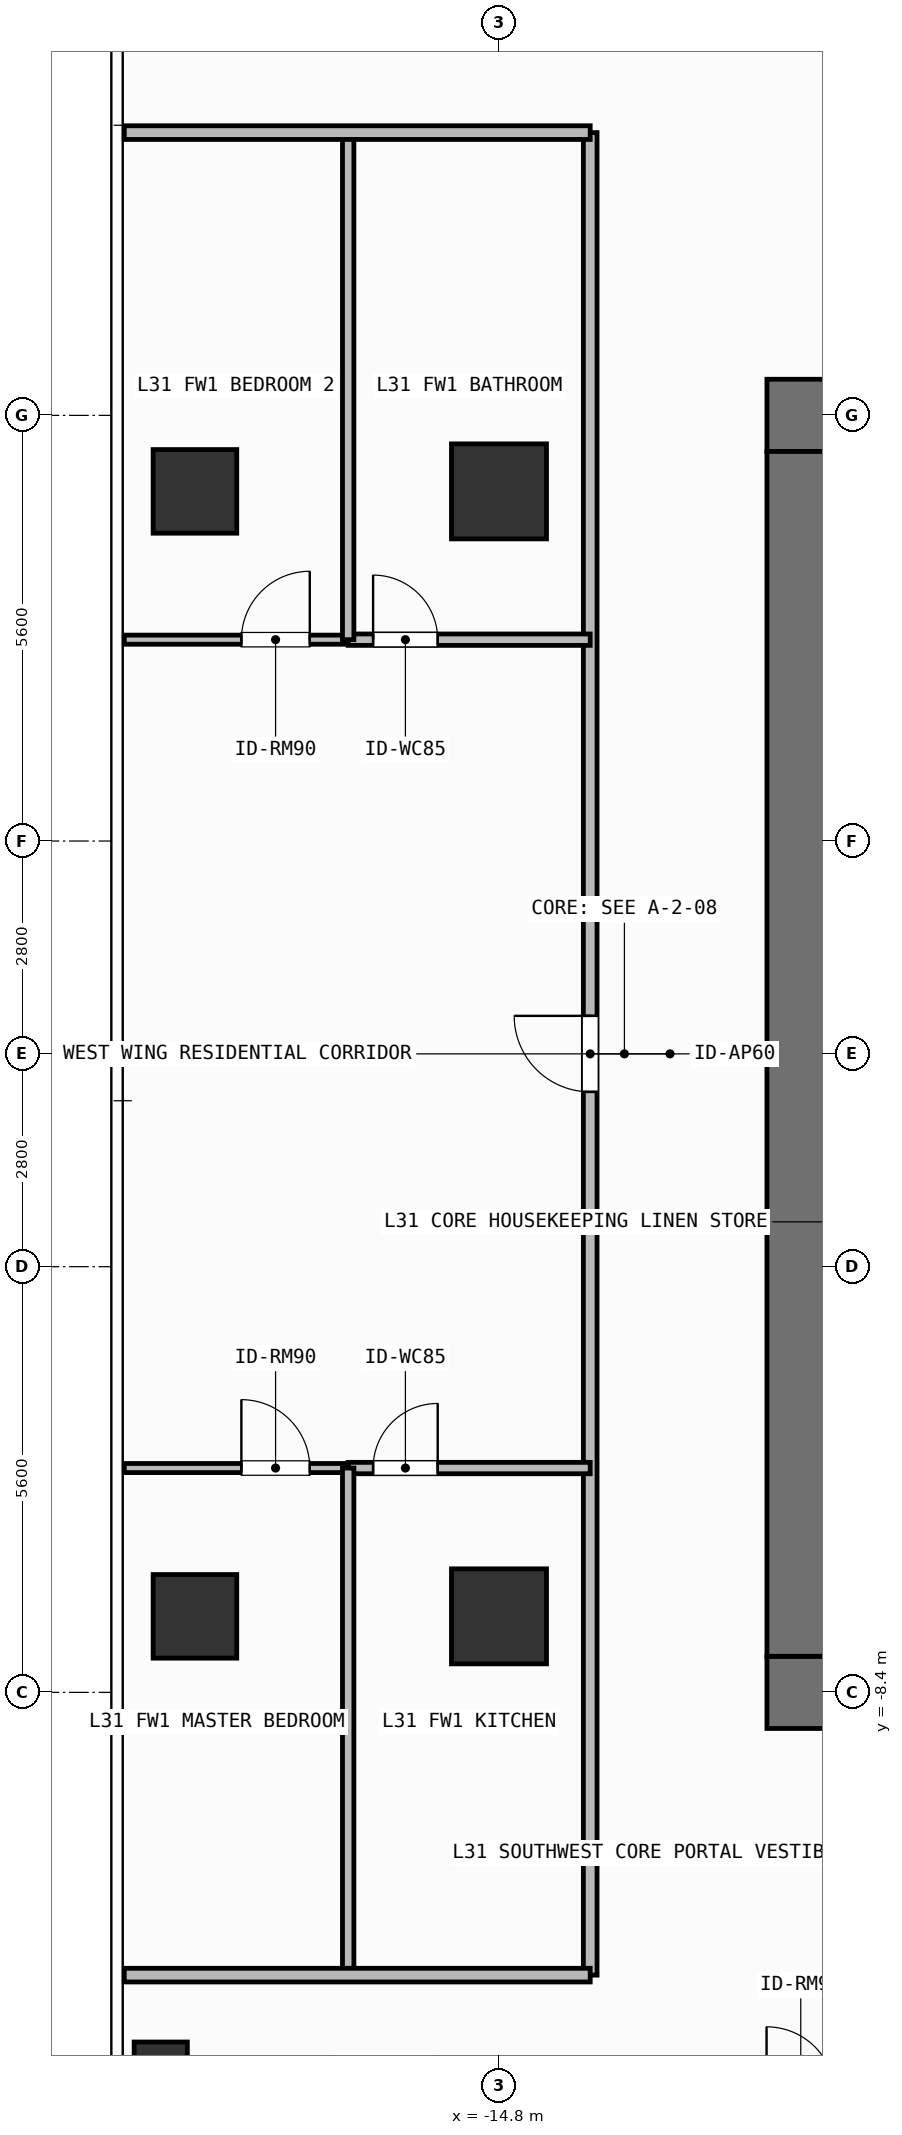
"""IFC4 building model, lengths in metres.
Left out: names, types, materials, properties, quantities, classifications, styles, units other than length and angle.
Written with IfcOpenShell. Run it as: python <this file> out.ifc"""

import sys

from ifc_helpers import new_model, si_unit, direction, frame, frame_2d, origin, origin_2d, place, context, subcontext, project, spatial, rectangle, hollow_rectangle, extrude, element, fill, save


model = new_model("IFC4")
c1 = context("Model", 3, precision=1e-05, world=origin(), true_north=direction((0.0, 1.0)))
c2 = subcontext(c1, "Body", "Model", "MODEL_VIEW")
j1 = project(units=[si_unit("LENGTHUNIT", "METRE"), si_unit("PLANEANGLEUNIT", "RADIAN")], contexts=[c1])
p1 = place(None, origin())
s1 = spatial("IfcSite", under=j1, at=p1, CompositionType="ELEMENT")
p2 = place(p1, origin())
s2 = spatial("IfcBuilding", under=s1, at=p2, CompositionType="ELEMENT")
p3 = place(p2, frame((0.0, 0.0, 125.1)))
s3 = spatial("IfcBuildingStorey", under=s2, at=p3, CompositionType="ELEMENT", Elevation=125.1)
for number, where, z_axis, x_axis in (
    (1, (-11.275, -8.4, 0.0), (0.0, 0.0, 1.0), (1.0, 0.0, 0.0)),
    (2, (-11.275, 8.4, 0.0), (0.0, 0.0, 1.0), (1.0, 0.0, 0.0)),
):
    element("IfcWall", number, at=place(p3, frame(where, z_axis=z_axis, x_axis=x_axis)), inside=s3, PredefinedType="SHEAR", context=c2, shape_type="SweptSolid", body=[
        extrude(rectangle(XDim=1.575, YDim=0.95, at=frame_2d((0.788, 0.0))), origin(), (0.0, 0.0, 1.0), 3.9),
    ])
p4 = place(p3, frame((-10.8, -7.925, 0.0), z_axis=(0.0, 0.0, 1.0), x_axis=(0.0, 1.0, 0.0)))
e3 = element("IfcWall", 3, at=p4, inside=s3, PredefinedType="SHEAR", context=c2, shape_type="SweptSolid", body=[
    extrude(rectangle(XDim=15.85, YDim=0.95, at=frame_2d((7.925, 0.0))), origin(), (0.0, 0.0, 1.0), 3.9),
])
for number, where, z_axis, x_axis in (
    (4, (-14.8, -7.4, 0.0), (0.0, 0.0, 1.0), (1.0, 0.0, 0.0)),
    (5, (-14.8, 7.4, 0.0), (0.0, 0.0, 1.0), (1.0, 0.0, 0.0)),
):
    element("IfcColumn", number, at=place(p3, frame(where, z_axis=z_axis, x_axis=x_axis)), inside=s3, PredefinedType="COLUMN", context=c2, shape_type="SweptSolid", body=[
        extrude(rectangle(XDim=1.25, YDim=1.25, at=origin_2d()), origin(), (0.0, 0.0, 1.0), 3.9),
    ])
for number, where, z_axis, x_axis in (
    (6, (-18.8, -7.4, 0.0), (0.0, 0.0, 1.0), (1.0, 0.0, 0.0)),
    (7, (-18.8, 7.4, 0.0), (0.0, 0.0, 1.0), (1.0, 0.0, 0.0)),
):
    element("IfcColumn", number, at=place(p3, frame(where, z_axis=z_axis, x_axis=x_axis)), inside=s3, PredefinedType="COLUMN", context=c2, shape_type="SweptSolid", body=[
        extrude(rectangle(XDim=1.1, YDim=1.1, at=origin_2d()), origin(), (0.0, 0.0, 1.0), 3.9),
    ])
p5 = place(p3, frame((-19.25, -13.35, 0.0), z_axis=(0.0, 0.0, 1.0), x_axis=(1.0, 0.0, 0.0)))
e8 = element("IfcColumn", 8, at=p5, inside=s3, PredefinedType="COLUMN", context=c2, shape_type="SweptSolid", body=[
    extrude(hollow_rectangle(XDim=0.7, YDim=0.7, WallThickness=0.032, at=origin_2d()), origin(), (0.0, 0.0, 1.0), 3.9),
])
p6 = place(p3, frame((-13.6, -12.12, 0.0), z_axis=(0.0, 0.0, 1.0), x_axis=(0.0, 1.0, 0.0)))
e9 = element("IfcWall", 9, at=p6, inside=s3, PredefinedType="PARTITIONING", context=c2, shape_type="SweptSolid", body=[
    extrude(rectangle(XDim=24.24, YDim=0.18, at=frame_2d((12.12, 0.0))), origin(), (0.0, 0.0, 1.0), 3.68),
])
p7 = place(p6, frame((11.62, 0.0, 0.0)))
e10 = element("IfcOpeningElement", 10, at=p7, cuts=e9, PredefinedType="OPENING", context=c2, shape_type="SweptSolid", body=[
    extrude(rectangle(XDim=1.0, YDim=2.2, at=frame_2d((0.5, 1.1))), frame((0.0, 0.1, 0.0), z_axis=(0.0, -1.0, 0.0), x_axis=(1.0, 0.0, 0.0)), (0.0, 0.0, 1.0), 0.2),
])
p8 = place(p3, frame((-16.784, 5.449, 0.0), z_axis=(0.0, 0.0, 1.0), x_axis=(1.0, 0.0, 0.0)))
e11 = element("IfcWall", 11, at=p8, inside=s3, PredefinedType="PARTITIONING", context=c2, shape_type="SweptSolid", body=[
    extrude(rectangle(XDim=3.184, YDim=0.15, at=frame_2d((1.592, 0.0))), origin(), (0.0, 0.0, 1.0), 3.68),
])
p9 = place(p8, frame((0.328, 0.0, 0.0)))
e12 = element("IfcOpeningElement", 12, at=p9, cuts=e11, PredefinedType="OPENING", context=c2, shape_type="SweptSolid", body=[
    extrude(rectangle(XDim=0.85, YDim=2.1, at=frame_2d((0.425, 1.05))), frame((0.0, 0.085, 0.0), z_axis=(0.0, -1.0, 0.0), x_axis=(1.0, 0.0, 0.0)), (0.0, 0.0, 1.0), 0.17),
])
p10 = place(p3, frame((-16.784, -5.449, 0.0), z_axis=(0.0, 0.0, 1.0), x_axis=(1.0, 0.0, 0.0)))
e13 = element("IfcWall", 13, at=p10, inside=s3, PredefinedType="PARTITIONING", context=c2, shape_type="SweptSolid", body=[
    extrude(rectangle(XDim=3.184, YDim=0.15, at=frame_2d((1.592, 0.0))), origin(), (0.0, 0.0, 1.0), 3.68),
])
p11 = place(p10, frame((0.328, 0.0, 0.0)))
e14 = element("IfcOpeningElement", 14, at=p11, cuts=e13, PredefinedType="OPENING", context=c2, shape_type="SweptSolid", body=[
    extrude(rectangle(XDim=0.85, YDim=2.1, at=frame_2d((0.425, 1.05))), frame((0.0, 0.085, 0.0), z_axis=(0.0, -1.0, 0.0), x_axis=(1.0, 0.0, 0.0)), (0.0, 0.0, 1.0), 0.17),
])
p12 = place(p3, frame((-19.73, -5.449, 0.0), z_axis=(0.0, 0.0, 1.0), x_axis=(1.0, 0.0, 0.0)))
e15 = element("IfcWall", 15, at=p12, inside=s3, PredefinedType="PARTITIONING", context=c2, shape_type="SweptSolid", body=[
    extrude(rectangle(XDim=2.946, YDim=0.12, at=frame_2d((1.473, 0.0))), origin(), (0.0, 0.0, 1.0), 3.68),
])
p13 = place(p12, frame((1.541, 0.0, 0.0)))
e16 = element("IfcOpeningElement", 16, at=p13, cuts=e15, PredefinedType="OPENING", context=c2, shape_type="SweptSolid", body=[
    extrude(rectangle(XDim=0.9, YDim=2.1, at=frame_2d((0.45, 1.05))), frame((0.0, 0.07, 0.0), z_axis=(0.0, -1.0, 0.0), x_axis=(1.0, 0.0, 0.0)), (0.0, 0.0, 1.0), 0.14),
])
p14 = place(p3, frame((-19.73, 5.449, 0.0), z_axis=(0.0, 0.0, 1.0), x_axis=(1.0, 0.0, 0.0)))
e17 = element("IfcWall", 17, at=p14, inside=s3, PredefinedType="PARTITIONING", context=c2, shape_type="SweptSolid", body=[
    extrude(rectangle(XDim=2.946, YDim=0.12, at=frame_2d((1.473, 0.0))), origin(), (0.0, 0.0, 1.0), 3.68),
])
p15 = place(p14, frame((1.541, 0.0, 0.0)))
e18 = element("IfcOpeningElement", 18, at=p15, cuts=e17, PredefinedType="OPENING", context=c2, shape_type="SweptSolid", body=[
    extrude(rectangle(XDim=0.9, YDim=2.1, at=frame_2d((0.45, 1.05))), frame((0.0, 0.07, 0.0), z_axis=(0.0, -1.0, 0.0), x_axis=(1.0, 0.0, 0.0)), (0.0, 0.0, 1.0), 0.14),
])
for number, where, z_axis, x_axis in (
    (19, (-16.784, -12.12, 0.0), (0.0, 0.0, 1.0), (0.0, 1.0, 0.0)),
    (20, (-16.784, 5.449, 0.0), (0.0, 0.0, 1.0), (0.0, 1.0, 0.0)),
):
    element("IfcWall", number, at=place(p3, frame(where, z_axis=z_axis, x_axis=x_axis)), inside=s3, PredefinedType="PARTITIONING", context=c2, shape_type="SweptSolid", body=[
        extrude(rectangle(XDim=6.671, YDim=0.15, at=frame_2d((3.335, 0.0))), origin(), (0.0, 0.0, 1.0), 3.68),
    ])
for number, where, z_axis, x_axis in (
    (21, (-19.73, -12.12, 0.0), (0.0, 0.0, 1.0), (1.0, 0.0, 0.0)),
    (22, (-19.73, 12.12, 0.0), (0.0, 0.0, 1.0), (1.0, 0.0, 0.0)),
):
    element("IfcWall", number, at=place(p3, frame(where, z_axis=z_axis, x_axis=x_axis)), inside=s3, PredefinedType="PARTITIONING", context=c2, shape_type="SweptSolid", body=[
        extrude(rectangle(XDim=6.13, YDim=0.18, at=frame_2d((3.065, 0.0))), origin(), (0.0, 0.0, 1.0), 3.68),
    ])
p16 = place(p7, origin())
e23 = element("IfcDoor", 23, at=p16, inside=s3, OperationType="SINGLE_SWING_RIGHT", PredefinedType="DOOR", context=c2, shape_type="SweptSolid", body=[
    extrude(rectangle(XDim=1.0, YDim=2.2, at=frame_2d((0.5, 1.1))), frame((0.0, 0.025, 0.0), z_axis=(0.0, -1.0, 0.0), x_axis=(1.0, 0.0, 0.0)), (0.0, 0.0, 1.0), 0.05),
])
fill(e10, e23)
p17 = place(p9, origin())
e24 = element("IfcDoor", 24, at=p17, inside=s3, OperationType="SINGLE_SWING_LEFT", PredefinedType="DOOR", context=c2, shape_type="SweptSolid", body=[
    extrude(rectangle(XDim=0.85, YDim=2.1, at=frame_2d((0.425, 1.05))), frame((0.0, 0.025, 0.0), z_axis=(0.0, -1.0, 0.0), x_axis=(1.0, 0.0, 0.0)), (0.0, 0.0, 1.0), 0.05),
])
fill(e12, e24)
p18 = place(p11, origin())
e25 = element("IfcDoor", 25, at=p18, inside=s3, OperationType="SINGLE_SWING_RIGHT", PredefinedType="DOOR", context=c2, shape_type="SweptSolid", body=[
    extrude(rectangle(XDim=0.85, YDim=2.1, at=frame_2d((0.425, 1.05))), frame((0.0, 0.025, 0.0), z_axis=(0.0, -1.0, 0.0), x_axis=(1.0, 0.0, 0.0)), (0.0, 0.0, 1.0), 0.05),
])
fill(e14, e25)
p19 = place(p13, origin())
e26 = element("IfcDoor", 26, at=p19, inside=s3, OperationType="SINGLE_SWING_LEFT", PredefinedType="DOOR", context=c2, shape_type="SweptSolid", body=[
    extrude(rectangle(XDim=0.9, YDim=2.1, at=frame_2d((0.45, 1.05))), frame((0.0, 0.025, 0.0), z_axis=(0.0, -1.0, 0.0), x_axis=(1.0, 0.0, 0.0)), (0.0, 0.0, 1.0), 0.05),
])
fill(e16, e26)
p20 = place(p15, origin())
e27 = element("IfcDoor", 27, at=p20, inside=s3, OperationType="SINGLE_SWING_RIGHT", PredefinedType="DOOR", context=c2, shape_type="SweptSolid", body=[
    extrude(rectangle(XDim=0.9, YDim=2.1, at=frame_2d((0.45, 1.05))), frame((0.0, 0.025, 0.0), z_axis=(0.0, -1.0, 0.0), x_axis=(1.0, 0.0, 0.0)), (0.0, 0.0, 1.0), 0.05),
])
fill(e18, e27)
save(model, sys.argv[1])
